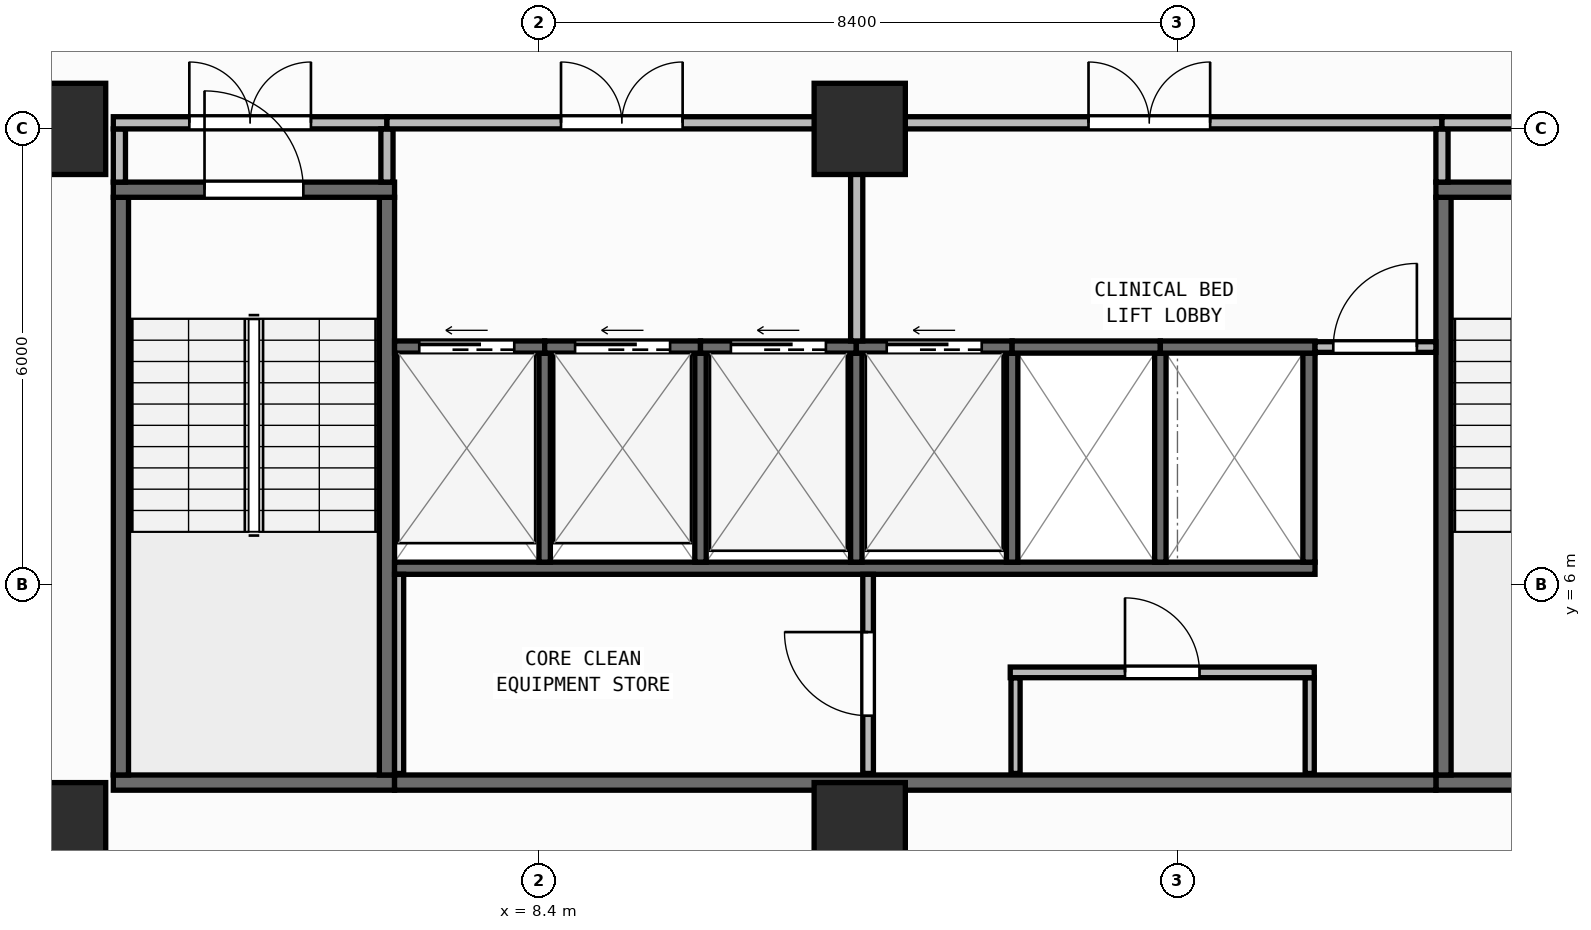
"""IFC4 building model, lengths in metres.
Left out: names, types, materials, properties, quantities, classifications, styles, units other than length and angle.
Written with IfcOpenShell. Run it as: python <this file> out.ifc"""

import sys

from ifc_helpers import new_model, si_unit, direction, frame, frame_2d, origin, origin_2d, place, context, subcontext, project, spatial, rectangle, extrude, element, fill, save


model = new_model("IFC4")
c1 = context("Model", 3, precision=1e-05, world=origin(), true_north=direction((0.0, 1.0)))
c2 = subcontext(c1, "Body", "Model", "MODEL_VIEW")
j1 = project(units=[si_unit("LENGTHUNIT", "METRE"), si_unit("PLANEANGLEUNIT", "RADIAN")], contexts=[c1])
p1 = place(None, origin())
s1 = spatial("IfcSite", under=j1, at=p1, CompositionType="ELEMENT")
p2 = place(p1, origin())
s2 = spatial("IfcBuilding", under=s1, at=p2, CompositionType="ELEMENT")
p3 = place(p2, frame((0.0, 0.0, 150.75)))
s3 = spatial("IfcBuildingStorey", under=s2, at=p3, CompositionType="ELEMENT", Elevation=150.75)
for number, where, z_axis, x_axis in (
    (1, (2.1, 2.8, 0.0), (0.0, 0.0, 1.0), (1.0, 0.0, 0.0)),
    (2, (12.62, 2.8, 0.0), (0.0, 0.0, 1.0), (1.0, 0.0, 0.0)),
    (3, (2.1, 12.0, 0.0), (0.0, 0.0, 1.0), (1.0, 0.0, 0.0)),
    (4, (12.62, 12.0, 0.0), (0.0, 0.0, 1.0), (1.0, 0.0, 0.0)),
):
    element("IfcColumn", number, at=place(p3, frame(where, z_axis=z_axis, x_axis=x_axis)), inside=s3, PredefinedType="COLUMN", context=c2, shape_type="SweptSolid", body=[
        extrude(rectangle(XDim=1.2, YDim=1.2, at=origin_2d()), origin(), (0.0, 0.0, 1.0), 3.95),
    ])
p4 = place(p3, frame((2.76, 0.173, 0.0), z_axis=(0.0, 0.0, 1.0), x_axis=(0.996857931723, 0.079210251617, 0.0)))
e5 = element("IfcWall", 5, at=p4, inside=s3, PredefinedType="STANDARD", context=c2, shape_type="SweptSolid", body=[
    extrude(rectangle(XDim=51.442, YDim=0.26, at=frame_2d((25.721, 0.0))), origin(), (0.0, 0.0, 1.0), 3.71),
])
p5 = place(p4, frame((24.521, 0.0, 0.9)))
e6 = element("IfcOpeningElement", 6, at=p5, cuts=e5, PredefinedType="OPENING", context=c2, shape_type="SweptSolid", body=[
    extrude(rectangle(XDim=2.4, YDim=1.65, at=frame_2d((1.2, 0.825))), frame((0.0, 0.14, 0.0), z_axis=(0.0, -1.0, 0.0), x_axis=(1.0, 0.0, 0.0)), (0.0, 0.0, 1.0), 0.28),
])
p6 = place(p3, frame((2.8, 3.4, 0.0), z_axis=(0.0, 0.0, 1.0), x_axis=(1.0, 0.0, 0.0)))
e7 = element("IfcWall", 7, at=p6, inside=s3, PredefinedType="SHEAR", context=c2, shape_type="SweptSolid", body=[
    extrude(rectangle(XDim=3.7, YDim=0.2, at=frame_2d((1.85, 0.0))), origin(), (0.0, 0.0, 1.0), 3.71),
])
for number, where, z_axis, x_axis in (
    (8, (2.9, 3.5, 0.0), (0.0, 0.0, 1.0), (0.0, 1.0, 0.0)),
    (9, (6.4, 3.5, 0.0), (0.0, 0.0, 1.0), (0.0, 1.0, 0.0)),
):
    element("IfcWall", number, at=place(p3, frame(where, z_axis=z_axis, x_axis=x_axis)), inside=s3, PredefinedType="SHEAR", context=c2, shape_type="SweptSolid", body=[
        extrude(rectangle(XDim=7.6, YDim=0.2, at=frame_2d((3.8, 0.0))), origin(), (0.0, 0.0, 1.0), 3.71),
    ])
p7 = place(p3, frame((2.8, 11.2, 0.0), z_axis=(0.0, 0.0, 1.0), x_axis=(1.0, 0.0, 0.0)))
e10 = element("IfcWall", 10, at=p7, inside=s3, PredefinedType="SHEAR", context=c2, shape_type="SweptSolid", body=[
    extrude(rectangle(XDim=3.7, YDim=0.2, at=frame_2d((1.85, 0.0))), origin(), (0.0, 0.0, 1.0), 3.71),
])
p8 = place(p7, frame((1.2, 0.0, 0.0)))
e11 = element("IfcOpeningElement", 11, at=p8, cuts=e10, PredefinedType="OPENING", context=c2, shape_type="SweptSolid", body=[
    extrude(rectangle(XDim=1.3, YDim=2.15, at=frame_2d((0.65, 1.075))), frame((0.0, 0.11, 0.0), z_axis=(0.0, -1.0, 0.0), x_axis=(1.0, 0.0, 0.0)), (0.0, 0.0, 1.0), 0.22),
])
p9 = place(p3, frame((20.2, 3.4, 0.0), z_axis=(0.0, 0.0, 1.0), x_axis=(1.0, 0.0, 0.0)))
e12 = element("IfcWall", 12, at=p9, inside=s3, PredefinedType="SHEAR", context=c2, shape_type="SweptSolid", body=[
    extrude(rectangle(XDim=3.7, YDim=0.2, at=frame_2d((1.85, 0.0))), origin(), (0.0, 0.0, 1.0), 3.71),
])
p10 = place(p3, frame((20.3, 3.5, 0.0), z_axis=(0.0, 0.0, 1.0), x_axis=(0.0, 1.0, 0.0)))
e13 = element("IfcWall", 13, at=p10, inside=s3, PredefinedType="SHEAR", context=c2, shape_type="SweptSolid", body=[
    extrude(rectangle(XDim=7.6, YDim=0.2, at=frame_2d((3.8, 0.0))), origin(), (0.0, 0.0, 1.0), 3.71),
])
p11 = place(p3, frame((20.2, 11.2, 0.0), z_axis=(0.0, 0.0, 1.0), x_axis=(1.0, 0.0, 0.0)))
e14 = element("IfcWall", 14, at=p11, inside=s3, PredefinedType="SHEAR", context=c2, shape_type="SweptSolid", body=[
    extrude(rectangle(XDim=3.7, YDim=0.2, at=frame_2d((1.85, 0.0))), origin(), (0.0, 0.0, 1.0), 3.71),
])
p12 = place(p11, frame((1.2, 0.0, 0.0)))
e15 = element("IfcOpeningElement", 15, at=p12, cuts=e14, PredefinedType="OPENING", context=c2, shape_type="SweptSolid", body=[
    extrude(rectangle(XDim=1.3, YDim=2.15, at=frame_2d((0.65, 1.075))), frame((0.0, 0.11, 0.0), z_axis=(0.0, -1.0, 0.0), x_axis=(1.0, 0.0, 0.0)), (0.0, 0.0, 1.0), 0.22),
])
p13 = place(p3, frame((6.5, 3.4, 0.0), z_axis=(0.0, 0.0, 1.0), x_axis=(1.0, 0.0, 0.0)))
e16 = element("IfcWall", 16, at=p13, inside=s3, PredefinedType="SHEAR", context=c2, shape_type="SweptSolid", body=[
    extrude(rectangle(XDim=13.7, YDim=0.2, at=frame_2d((6.85, 0.0))), origin(), (0.0, 0.0, 1.0), 3.71),
])
p14 = place(p3, frame((6.5, 6.22, 0.0), z_axis=(0.0, 0.0, 1.0), x_axis=(1.0, 0.0, 0.0)))
e17 = element("IfcWall", 17, at=p14, inside=s3, PredefinedType="SHEAR", context=c2, shape_type="SweptSolid", body=[
    extrude(rectangle(XDim=12.11, YDim=0.16, at=frame_2d((6.055, 0.0))), origin(), (0.0, 0.0, 1.0), 3.71),
])
p15 = place(p3, frame((18.53, 6.3, 0.0), z_axis=(0.0, 0.0, 1.0), x_axis=(0.0, 1.0, 0.0)))
e18 = element("IfcWall", 18, at=p15, inside=s3, PredefinedType="SHEAR", context=c2, shape_type="SweptSolid", body=[
    extrude(rectangle(XDim=2.75, YDim=0.16, at=frame_2d((1.375, 0.0))), origin(), (0.0, 0.0, 1.0), 3.71),
])
for number, where, z_axis, x_axis in (
    (19, (8.475, 6.3, 0.0), (0.0, 0.0, 1.0), (0.0, 1.0, 0.0)),
    (20, (10.525, 6.3, 0.0), (0.0, 0.0, 1.0), (0.0, 1.0, 0.0)),
    (21, (12.575, 6.3, 0.0), (0.0, 0.0, 1.0), (0.0, 1.0, 0.0)),
    (22, (14.625, 6.3, 0.0), (0.0, 0.0, 1.0), (0.0, 1.0, 0.0)),
    (23, (16.575, 6.3, 0.0), (0.0, 0.0, 1.0), (0.0, 1.0, 0.0)),
):
    element("IfcWall", number, at=place(p3, frame(where, z_axis=z_axis, x_axis=x_axis)), inside=s3, PredefinedType="SHEAR", context=c2, shape_type="SweptSolid", body=[
        extrude(rectangle(XDim=2.75, YDim=0.15, at=frame_2d((1.375, 0.0))), origin(), (0.0, 0.0, 1.0), 3.71),
    ])
p16 = place(p3, frame((6.5, 9.13, 0.0), z_axis=(0.0, 0.0, 1.0), x_axis=(1.0, 0.0, 0.0)))
e24 = element("IfcWall", 24, at=p16, inside=s3, PredefinedType="SHEAR", context=c2, shape_type="SweptSolid", body=[
    extrude(rectangle(XDim=1.975, YDim=0.16, at=frame_2d((0.988, 0.0))), origin(), (0.0, 0.0, 1.0), 3.71),
])
p17 = place(p16, frame((0.325, 0.0, 0.0)))
e25 = element("IfcOpeningElement", 25, at=p17, cuts=e24, PredefinedType="OPENING", context=c2, shape_type="SweptSolid", body=[
    extrude(rectangle(XDim=1.25, YDim=2.15, at=frame_2d((0.625, 1.075))), frame((0.0, 0.09, 0.0), z_axis=(0.0, -1.0, 0.0), x_axis=(1.0, 0.0, 0.0)), (0.0, 0.0, 1.0), 0.18),
])
p18 = place(p3, frame((8.475, 9.13, 0.0), z_axis=(0.0, 0.0, 1.0), x_axis=(1.0, 0.0, 0.0)))
e26 = element("IfcWall", 26, at=p18, inside=s3, PredefinedType="SHEAR", context=c2, shape_type="SweptSolid", body=[
    extrude(rectangle(XDim=2.05, YDim=0.16, at=frame_2d((1.025, 0.0))), origin(), (0.0, 0.0, 1.0), 3.71),
])
p19 = place(p18, frame((0.4, 0.0, 0.0)))
e27 = element("IfcOpeningElement", 27, at=p19, cuts=e26, PredefinedType="OPENING", context=c2, shape_type="SweptSolid", body=[
    extrude(rectangle(XDim=1.25, YDim=2.15, at=frame_2d((0.625, 1.075))), frame((0.0, 0.09, 0.0), z_axis=(0.0, -1.0, 0.0), x_axis=(1.0, 0.0, 0.0)), (0.0, 0.0, 1.0), 0.18),
])
p20 = place(p3, frame((10.525, 9.13, 0.0), z_axis=(0.0, 0.0, 1.0), x_axis=(1.0, 0.0, 0.0)))
e28 = element("IfcWall", 28, at=p20, inside=s3, PredefinedType="SHEAR", context=c2, shape_type="SweptSolid", body=[
    extrude(rectangle(XDim=2.05, YDim=0.16, at=frame_2d((1.025, 0.0))), origin(), (0.0, 0.0, 1.0), 3.71),
])
p21 = place(p20, frame((0.4, 0.0, 0.0)))
e29 = element("IfcOpeningElement", 29, at=p21, cuts=e28, PredefinedType="OPENING", context=c2, shape_type="SweptSolid", body=[
    extrude(rectangle(XDim=1.25, YDim=2.15, at=frame_2d((0.625, 1.075))), frame((0.0, 0.09, 0.0), z_axis=(0.0, -1.0, 0.0), x_axis=(1.0, 0.0, 0.0)), (0.0, 0.0, 1.0), 0.18),
])
p22 = place(p3, frame((12.575, 9.13, 0.0), z_axis=(0.0, 0.0, 1.0), x_axis=(1.0, 0.0, 0.0)))
e30 = element("IfcWall", 30, at=p22, inside=s3, PredefinedType="SHEAR", context=c2, shape_type="SweptSolid", body=[
    extrude(rectangle(XDim=2.05, YDim=0.16, at=frame_2d((1.025, 0.0))), origin(), (0.0, 0.0, 1.0), 3.71),
])
p23 = place(p22, frame((0.4, 0.0, 0.0)))
e31 = element("IfcOpeningElement", 31, at=p23, cuts=e30, PredefinedType="OPENING", context=c2, shape_type="SweptSolid", body=[
    extrude(rectangle(XDim=1.25, YDim=2.15, at=frame_2d((0.625, 1.075))), frame((0.0, 0.09, 0.0), z_axis=(0.0, -1.0, 0.0), x_axis=(1.0, 0.0, 0.0)), (0.0, 0.0, 1.0), 0.18),
])
p24 = place(p3, frame((14.625, 9.13, 0.0), z_axis=(0.0, 0.0, 1.0), x_axis=(1.0, 0.0, 0.0)))
e32 = element("IfcWall", 32, at=p24, inside=s3, PredefinedType="SHEAR", context=c2, shape_type="SweptSolid", body=[
    extrude(rectangle(XDim=1.95, YDim=0.16, at=frame_2d((0.975, 0.0))), origin(), (0.0, 0.0, 1.0), 3.71),
])
p25 = place(p3, frame((16.575, 9.13, 0.0), z_axis=(0.0, 0.0, 1.0), x_axis=(1.0, 0.0, 0.0)))
e33 = element("IfcWall", 33, at=p25, inside=s3, PredefinedType="SHEAR", context=c2, shape_type="SweptSolid", body=[
    extrude(rectangle(XDim=2.035, YDim=0.16, at=frame_2d((1.018, 0.0))), origin(), (0.0, 0.0, 1.0), 3.71),
])
p26 = place(p3, frame((6.56, 3.52, 0.0), z_axis=(0.0, 0.0, 1.0), x_axis=(0.0, 1.0, 0.0)))
e34 = element("IfcWall", 34, at=p26, inside=s3, PredefinedType="PARTITIONING", context=c2, shape_type="SweptSolid", body=[
    extrude(rectangle(XDim=2.62, YDim=0.12, at=frame_2d((1.31, 0.0))), origin(), (0.0, 0.0, 1.0), 3.71),
])
p27 = place(p3, frame((12.73, 3.52, 0.0), z_axis=(0.0, 0.0, 1.0), x_axis=(0.0, 1.0, 0.0)))
e35 = element("IfcWall", 35, at=p27, inside=s3, PredefinedType="PARTITIONING", context=c2, shape_type="SweptSolid", body=[
    extrude(rectangle(XDim=2.62, YDim=0.14, at=frame_2d((1.31, 0.0))), origin(), (0.0, 0.0, 1.0), 3.71),
])
p28 = place(p27, frame((0.76, 0.0, 0.0)))
e36 = element("IfcOpeningElement", 36, at=p28, cuts=e35, PredefinedType="OPENING", context=c2, shape_type="SweptSolid", body=[
    extrude(rectangle(XDim=1.1, YDim=2.1, at=frame_2d((0.55, 1.05))), frame((0.0, 0.08, 0.0), z_axis=(0.0, -1.0, 0.0), x_axis=(1.0, 0.0, 0.0)), (0.0, 0.0, 1.0), 0.16),
])
for number, where, z_axis, x_axis in (
    (37, (14.67, 3.52, 0.0), (0.0, 0.0, 1.0), (0.0, 1.0, 0.0)),
    (38, (18.54, 3.52, 0.0), (0.0, 0.0, 1.0), (0.0, 1.0, 0.0)),
):
    element("IfcWall", number, at=place(p3, frame(where, z_axis=z_axis, x_axis=x_axis)), inside=s3, PredefinedType="PARTITIONING", context=c2, shape_type="SweptSolid", body=[
        extrude(rectangle(XDim=1.26, YDim=0.12, at=frame_2d((0.63, 0.0))), origin(), (0.0, 0.0, 1.0), 3.71),
    ])
p29 = place(p3, frame((14.6, 4.85, 0.0), z_axis=(0.0, 0.0, 1.0), x_axis=(1.0, 0.0, 0.0)))
e39 = element("IfcWall", 39, at=p29, inside=s3, PredefinedType="PARTITIONING", context=c2, shape_type="SweptSolid", body=[
    extrude(rectangle(XDim=4.0, YDim=0.14, at=frame_2d((2.0, 0.0))), origin(), (0.0, 0.0, 1.0), 3.71),
])
p30 = place(p29, frame((1.51, 0.0, 0.0)))
e40 = element("IfcOpeningElement", 40, at=p30, cuts=e39, PredefinedType="OPENING", context=c2, shape_type="SweptSolid", body=[
    extrude(rectangle(XDim=0.98, YDim=2.1, at=frame_2d((0.49, 1.05))), frame((0.0, 0.08, 0.0), z_axis=(0.0, -1.0, 0.0), x_axis=(1.0, 0.0, 0.0)), (0.0, 0.0, 1.0), 0.16),
])
p31 = place(p3, frame((18.61, 9.13, 0.0), z_axis=(0.0, 0.0, 1.0), x_axis=(1.0, 0.0, 0.0)))
e41 = element("IfcWall", 41, at=p31, inside=s3, PredefinedType="PARTITIONING", context=c2, shape_type="SweptSolid", body=[
    extrude(rectangle(XDim=1.59, YDim=0.14, at=frame_2d((0.795, 0.0))), origin(), (0.0, 0.0, 1.0), 3.71),
])
p32 = place(p31, frame((0.24, 0.0, 0.0)))
e42 = element("IfcOpeningElement", 42, at=p32, cuts=e41, PredefinedType="OPENING", context=c2, shape_type="SweptSolid", body=[
    extrude(rectangle(XDim=1.1, YDim=2.1, at=frame_2d((0.55, 1.05))), frame((0.0, 0.08, 0.0), z_axis=(0.0, -1.0, 0.0), x_axis=(1.0, 0.0, 0.0)), (0.0, 0.0, 1.0), 0.16),
])
p33 = place(p3, frame((2.88, 11.3, 0.0), z_axis=(0.0, 0.0, 1.0), x_axis=(0.0, 1.0, 0.0)))
e43 = element("IfcWall", 43, at=p33, inside=s3, PredefinedType="PARTITIONING", context=c2, shape_type="SweptSolid", body=[
    extrude(rectangle(XDim=0.7, YDim=0.16, at=frame_2d((0.35, 0.0))), origin(), (0.0, 0.0, 1.0), 3.71),
])
p34 = place(p3, frame((2.8, 12.08, 0.0), z_axis=(0.0, 0.0, 1.0), x_axis=(1.0, 0.0, 0.0)))
e44 = element("IfcWall", 44, at=p34, inside=s3, PredefinedType="PARTITIONING", context=c2, shape_type="SweptSolid", body=[
    extrude(rectangle(XDim=3.6, YDim=0.16, at=frame_2d((1.8, 0.0))), origin(), (0.0, 0.0, 1.0), 3.083),
])
p35 = place(p34, frame((1.0, 0.0, 0.0)))
e45 = element("IfcOpeningElement", 45, at=p35, cuts=e44, PredefinedType="OPENING", context=c2, shape_type="SweptSolid", body=[
    extrude(rectangle(XDim=1.6, YDim=2.05, at=frame_2d((0.8, 1.025))), frame((0.0, 0.09, 0.0), z_axis=(0.0, -1.0, 0.0), x_axis=(1.0, 0.0, 0.0)), (0.0, 0.0, 1.0), 0.18),
])
p36 = place(p3, frame((6.4, 11.3, 0.0), z_axis=(0.0, 0.0, 1.0), x_axis=(0.0, 1.0, 0.0)))
e46 = element("IfcWall", 46, at=p36, inside=s3, PredefinedType="PARTITIONING", context=c2, shape_type="SweptSolid", body=[
    extrude(rectangle(XDim=0.7, YDim=0.16, at=frame_2d((0.35, 0.0))), origin(), (0.0, 0.0, 1.0), 3.71),
])
p37 = place(p3, frame((6.4, 12.08, 0.0), z_axis=(0.0, 0.0, 1.0), x_axis=(1.0, 0.0, 0.0)))
e47 = element("IfcWall", 47, at=p37, inside=s3, PredefinedType="PARTITIONING", context=c2, shape_type="SweptSolid", body=[
    extrude(rectangle(XDim=6.18, YDim=0.16, at=frame_2d((3.09, 0.0))), origin(), (0.0, 0.0, 1.0), 3.083),
])
p38 = place(p37, frame((2.29, 0.0, 0.0)))
e48 = element("IfcOpeningElement", 48, at=p38, cuts=e47, PredefinedType="OPENING", context=c2, shape_type="SweptSolid", body=[
    extrude(rectangle(XDim=1.6, YDim=2.05, at=frame_2d((0.8, 1.025))), frame((0.0, 0.09, 0.0), z_axis=(0.0, -1.0, 0.0), x_axis=(1.0, 0.0, 0.0)), (0.0, 0.0, 1.0), 0.18),
])
p39 = place(p3, frame((12.58, 9.21, 0.0), z_axis=(0.0, 0.0, 1.0), x_axis=(0.0, 1.0, 0.0)))
e49 = element("IfcWall", 49, at=p39, inside=s3, PredefinedType="PARTITIONING", context=c2, shape_type="SweptSolid", body=[
    extrude(rectangle(XDim=2.79, YDim=0.16, at=frame_2d((1.395, 0.0))), origin(), (0.0, 0.0, 1.0), 3.71),
])
p40 = place(p3, frame((12.58, 12.08, 0.0), z_axis=(0.0, 0.0, 1.0), x_axis=(1.0, 0.0, 0.0)))
e50 = element("IfcWall", 50, at=p40, inside=s3, PredefinedType="PARTITIONING", context=c2, shape_type="SweptSolid", body=[
    extrude(rectangle(XDim=7.7, YDim=0.16, at=frame_2d((3.85, 0.0))), origin(), (0.0, 0.0, 1.0), 3.083),
])
p41 = place(p40, frame((3.05, 0.0, 0.0)))
e51 = element("IfcOpeningElement", 51, at=p41, cuts=e50, PredefinedType="OPENING", context=c2, shape_type="SweptSolid", body=[
    extrude(rectangle(XDim=1.6, YDim=2.05, at=frame_2d((0.8, 1.025))), frame((0.0, 0.09, 0.0), z_axis=(0.0, -1.0, 0.0), x_axis=(1.0, 0.0, 0.0)), (0.0, 0.0, 1.0), 0.18),
])
p42 = place(p3, frame((20.28, 11.3, 0.0), z_axis=(0.0, 0.0, 1.0), x_axis=(0.0, 1.0, 0.0)))
e52 = element("IfcWall", 52, at=p42, inside=s3, PredefinedType="PARTITIONING", context=c2, shape_type="SweptSolid", body=[
    extrude(rectangle(XDim=0.7, YDim=0.16, at=frame_2d((0.35, 0.0))), origin(), (0.0, 0.0, 1.0), 3.71),
])
p43 = place(p3, frame((20.28, 12.08, 0.0), z_axis=(0.0, 0.0, 1.0), x_axis=(1.0, 0.0, 0.0)))
e53 = element("IfcWall", 53, at=p43, inside=s3, PredefinedType="PARTITIONING", context=c2, shape_type="SweptSolid", body=[
    extrude(rectangle(XDim=3.62, YDim=0.16, at=frame_2d((1.81, 0.0))), origin(), (0.0, 0.0, 1.0), 3.083),
])
p44 = place(p43, frame((1.01, 0.0, 0.0)))
e54 = element("IfcOpeningElement", 54, at=p44, cuts=e53, PredefinedType="OPENING", context=c2, shape_type="SweptSolid", body=[
    extrude(rectangle(XDim=1.6, YDim=2.05, at=frame_2d((0.8, 1.025))), frame((0.0, 0.09, 0.0), z_axis=(0.0, -1.0, 0.0), x_axis=(1.0, 0.0, 0.0)), (0.0, 0.0, 1.0), 0.18),
])
p45 = place(p8, origin())
e55 = element("IfcDoor", 55, at=p45, inside=s3, OperationType="SINGLE_SWING_LEFT", PredefinedType="DOOR", context=c2, shape_type="SweptSolid", body=[
    extrude(rectangle(XDim=1.3, YDim=2.15, at=frame_2d((0.65, 1.075))), frame((0.0, 0.025, 0.0), z_axis=(0.0, -1.0, 0.0), x_axis=(1.0, 0.0, 0.0)), (0.0, 0.0, 1.0), 0.05),
])
fill(e11, e55)
p46 = place(p17, origin())
e56 = element("IfcDoor", 56, at=p46, inside=s3, OperationType="SLIDING_TO_LEFT", PredefinedType="DOOR", context=c2, shape_type="SweptSolid", body=[
    extrude(rectangle(XDim=1.25, YDim=2.15, at=frame_2d((0.625, 1.075))), frame((0.0, 0.025, 0.0), z_axis=(0.0, -1.0, 0.0), x_axis=(1.0, 0.0, 0.0)), (0.0, 0.0, 1.0), 0.05),
])
fill(e25, e56)
p47 = place(p19, origin())
e57 = element("IfcDoor", 57, at=p47, inside=s3, OperationType="SLIDING_TO_LEFT", PredefinedType="DOOR", context=c2, shape_type="SweptSolid", body=[
    extrude(rectangle(XDim=1.25, YDim=2.15, at=frame_2d((0.625, 1.075))), frame((0.0, 0.025, 0.0), z_axis=(0.0, -1.0, 0.0), x_axis=(1.0, 0.0, 0.0)), (0.0, 0.0, 1.0), 0.05),
])
fill(e27, e57)
p48 = place(p21, origin())
e58 = element("IfcDoor", 58, at=p48, inside=s3, OperationType="SLIDING_TO_LEFT", PredefinedType="DOOR", context=c2, shape_type="SweptSolid", body=[
    extrude(rectangle(XDim=1.25, YDim=2.15, at=frame_2d((0.625, 1.075))), frame((0.0, 0.025, 0.0), z_axis=(0.0, -1.0, 0.0), x_axis=(1.0, 0.0, 0.0)), (0.0, 0.0, 1.0), 0.05),
])
fill(e29, e58)
p49 = place(p23, origin())
e59 = element("IfcDoor", 59, at=p49, inside=s3, OperationType="SLIDING_TO_LEFT", PredefinedType="DOOR", context=c2, shape_type="SweptSolid", body=[
    extrude(rectangle(XDim=1.25, YDim=2.15, at=frame_2d((0.625, 1.075))), frame((0.0, 0.025, 0.0), z_axis=(0.0, -1.0, 0.0), x_axis=(1.0, 0.0, 0.0)), (0.0, 0.0, 1.0), 0.05),
])
fill(e31, e59)
p50 = place(p28, origin())
e60 = element("IfcDoor", 60, at=p50, inside=s3, OperationType="SINGLE_SWING_RIGHT", PredefinedType="DOOR", context=c2, shape_type="SweptSolid", body=[
    extrude(rectangle(XDim=1.1, YDim=2.1, at=frame_2d((0.55, 1.05))), frame((0.0, 0.025, 0.0), z_axis=(0.0, -1.0, 0.0), x_axis=(1.0, 0.0, 0.0)), (0.0, 0.0, 1.0), 0.05),
])
fill(e36, e60)
p51 = place(p30, origin())
e61 = element("IfcDoor", 61, at=p51, inside=s3, OperationType="SINGLE_SWING_LEFT", PredefinedType="DOOR", context=c2, shape_type="SweptSolid", body=[
    extrude(rectangle(XDim=0.98, YDim=2.1, at=frame_2d((0.49, 1.05))), frame((0.0, 0.025, 0.0), z_axis=(0.0, -1.0, 0.0), x_axis=(1.0, 0.0, 0.0)), (0.0, 0.0, 1.0), 0.05),
])
fill(e40, e61)
p52 = place(p32, origin())
e62 = element("IfcDoor", 62, at=p52, inside=s3, OperationType="SINGLE_SWING_RIGHT", PredefinedType="DOOR", context=c2, shape_type="SweptSolid", body=[
    extrude(rectangle(XDim=1.1, YDim=2.1, at=frame_2d((0.55, 1.05))), frame((0.0, 0.025, 0.0), z_axis=(0.0, -1.0, 0.0), x_axis=(1.0, 0.0, 0.0)), (0.0, 0.0, 1.0), 0.05),
])
fill(e42, e62)
p53 = place(p35, origin())
e63 = element("IfcDoor", 63, at=p53, inside=s3, OperationType="DOUBLE_DOOR_SINGLE_SWING", PredefinedType="DOOR", context=c2, shape_type="SweptSolid", body=[
    extrude(rectangle(XDim=1.6, YDim=2.05, at=frame_2d((0.8, 1.025))), frame((0.0, 0.025, 0.0), z_axis=(0.0, -1.0, 0.0), x_axis=(1.0, 0.0, 0.0)), (0.0, 0.0, 1.0), 0.05),
])
fill(e45, e63)
p54 = place(p38, origin())
e64 = element("IfcDoor", 64, at=p54, inside=s3, OperationType="DOUBLE_DOOR_SINGLE_SWING", PredefinedType="DOOR", context=c2, shape_type="SweptSolid", body=[
    extrude(rectangle(XDim=1.6, YDim=2.05, at=frame_2d((0.8, 1.025))), frame((0.0, 0.025, 0.0), z_axis=(0.0, -1.0, 0.0), x_axis=(1.0, 0.0, 0.0)), (0.0, 0.0, 1.0), 0.05),
])
fill(e48, e64)
p55 = place(p41, origin())
e65 = element("IfcDoor", 65, at=p55, inside=s3, OperationType="DOUBLE_DOOR_SINGLE_SWING", PredefinedType="DOOR", context=c2, shape_type="SweptSolid", body=[
    extrude(rectangle(XDim=1.6, YDim=2.05, at=frame_2d((0.8, 1.025))), frame((0.0, 0.025, 0.0), z_axis=(0.0, -1.0, 0.0), x_axis=(1.0, 0.0, 0.0)), (0.0, 0.0, 1.0), 0.05),
])
fill(e51, e65)
save(model, sys.argv[1])
